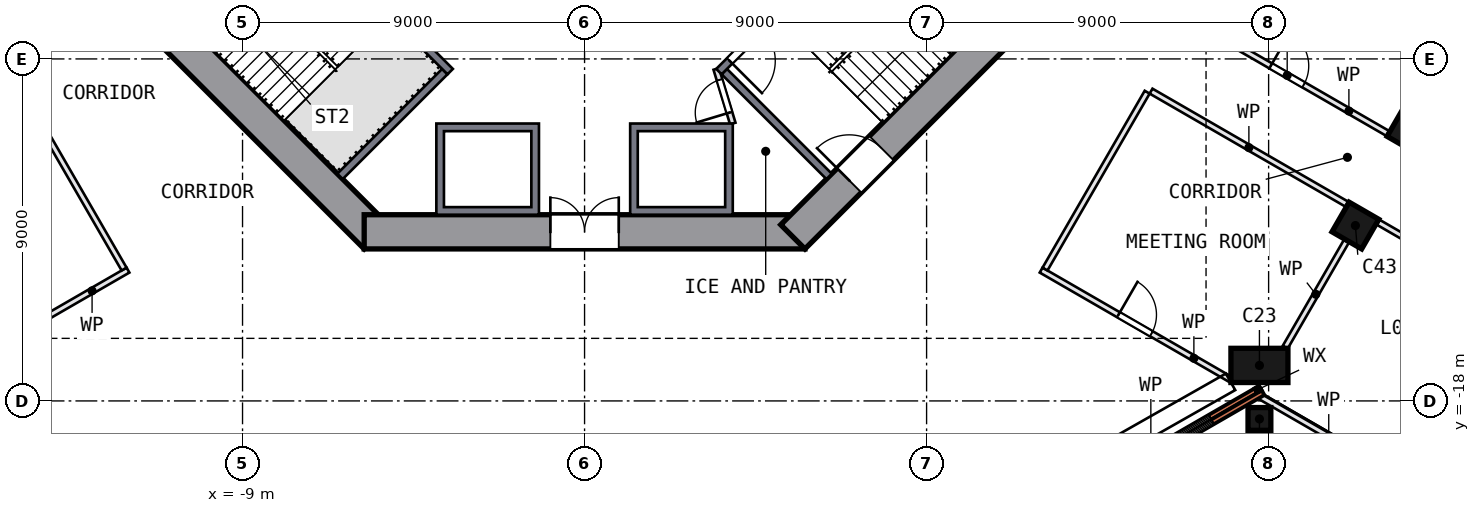
"""IFC4 building model, lengths in metres.
Left out: names, types, materials, properties, quantities, classifications, styles, units other than length and angle.
Written with IfcOpenShell. Run it as: python <this file> out.ifc"""

import sys

from ifc_helpers import new_model, si_unit, direction, frame, frame_2d, origin, origin_2d, place, context, subcontext, project, spatial, polyline, rectangle, outline, extrude, element, fill, save


model = new_model("IFC4")
c1 = context("Model", 3, precision=1e-05, world=origin(), true_north=direction((0.0, 1.0)))
c2 = subcontext(c1, "Body", "Model", "MODEL_VIEW")
j1 = project(units=[si_unit("LENGTHUNIT", "METRE"), si_unit("PLANEANGLEUNIT", "RADIAN")], contexts=[c1])
p1 = place(None, origin())
s1 = spatial("IfcSite", under=j1, at=p1, CompositionType="ELEMENT")
p2 = place(p1, origin())
s2 = spatial("IfcBuilding", under=s1, at=p2, CompositionType="ELEMENT")
p3 = place(p2, frame((0.0, 0.0, 14.0)))
s3 = spatial("IfcBuildingStorey", under=s2, at=p3, CompositionType="ELEMENT", Elevation=14.0)
p4 = place(p3, frame((17.758, -17.065, 0.0), z_axis=(0.0, 0.0, 1.0), x_axis=(-1.0, 0.0, 0.0)))
e1 = element("IfcColumn", 1, at=p4, inside=s3, PredefinedType="COLUMN", context=c2, shape_type="SweptSolid", body=[
    extrude(rectangle(XDim=1.5, YDim=0.9, at=origin_2d()), origin(), (0.0, 0.0, 1.0), 4.55),
])
for number, where, z_axis, x_axis in (
    (2, (20.283, -13.385, 0.0), (0.0, 0.0, 1.0), (0.866, -0.5, 0.0)),
    (3, (21.733, -10.873, 0.0), (0.0, 0.0, 1.0), (0.866, -0.5, 0.0)),
):
    element("IfcColumn", number, at=place(p3, frame(where, z_axis=z_axis, x_axis=x_axis)), inside=s3, PredefinedType="COLUMN", context=c2, shape_type="SweptSolid", body=[
        extrude(rectangle(XDim=0.9, YDim=0.9, at=origin_2d()), origin(), (0.0, 0.0, 1.0), 4.55),
    ])
p5 = place(p3, frame((-13.682, -5.481, 0.0), z_axis=(0.0, 0.0, 1.0), x_axis=(0.707106781, -0.707106781, 0.0)))
e4 = element("IfcWall", 4, at=p5, inside=s3, PredefinedType="SHEAR", context=c2, shape_type="SweptSolid", body=[
    extrude(rectangle(XDim=11.598, YDim=0.9, at=frame_2d((5.799, 0.0))), origin(), (0.0, 0.0, 1.0), 5.0),
])
p6 = place(p5, frame((2.099, 0.0, 0.0)))
e5 = element("IfcOpeningElement", 5, at=p6, cuts=e4, PredefinedType="OPENING", context=c2, shape_type="SweptSolid", body=[
    extrude(rectangle(XDim=1.2, YDim=2.1, at=frame_2d((0.6, 1.05))), frame((0.0, 0.46, 0.0), z_axis=(0.0, -1.0, 0.0), x_axis=(1.0, 0.0, 0.0)), (0.0, 0.0, 1.0), 0.92),
])
p7 = place(p3, frame((-5.799, -13.55, 0.0), z_axis=(0.0, 0.0, 1.0), x_axis=(1.0, 0.0, 0.0)))
e6 = element("IfcWall", 6, at=p7, inside=s3, PredefinedType="SHEAR", context=c2, shape_type="SweptSolid", body=[
    extrude(rectangle(XDim=11.598, YDim=0.9, at=frame_2d((5.799, 0.0))), origin(), (0.0, 0.0, 1.0), 5.0),
])
p8 = place(p7, frame((4.899, 0.0, 0.0)))
e7 = element("IfcOpeningElement", 7, at=p8, cuts=e6, PredefinedType="OPENING", context=c2, shape_type="SweptSolid", body=[
    extrude(rectangle(XDim=1.8, YDim=2.1, at=frame_2d((0.9, 1.05))), frame((0.0, 0.46, 0.0), z_axis=(0.0, -1.0, 0.0), x_axis=(1.0, 0.0, 0.0)), (0.0, 0.0, 1.0), 0.92),
])
p9 = place(p3, frame((5.481, -13.682, 0.0), z_axis=(0.0, 0.0, 1.0), x_axis=(0.707106781, 0.707106781, 0.0)))
e8 = element("IfcWall", 8, at=p9, inside=s3, PredefinedType="SHEAR", context=c2, shape_type="SweptSolid", body=[
    extrude(rectangle(XDim=11.598, YDim=0.9, at=frame_2d((5.799, 0.0))), origin(), (0.0, 0.0, 1.0), 5.0),
])
p10 = place(p9, frame((2.099, 0.0, 0.0)))
e9 = element("IfcOpeningElement", 9, at=p10, cuts=e8, PredefinedType="OPENING", context=c2, shape_type="SweptSolid", body=[
    extrude(rectangle(XDim=1.2, YDim=2.1, at=frame_2d((0.6, 1.05))), frame((0.0, 0.46, 0.0), z_axis=(0.0, -1.0, 0.0), x_axis=(1.0, 0.0, 0.0)), (0.0, 0.0, 1.0), 0.92),
])
p11 = place(p3, frame((17.758, -18.474, 0.0), z_axis=(0.0, 0.0, 1.0), x_axis=(0.0, -1.0, 0.0)))
e10 = element("IfcColumn", 10, at=p11, inside=s3, PredefinedType="COLUMN", context=c2, shape_type="SweptSolid", body=[
    extrude(rectangle(XDim=0.6, YDim=0.6, at=origin_2d()), origin(), (0.0, 0.0, 1.0), 5.0),
])
p12 = place(p3, frame((-17.828, -17.637, 0.0), z_axis=(0.0, 0.0, 1.0), x_axis=(0.866029009, -0.499993756, 0.0)))
e11 = element("IfcWall", 11, at=p12, inside=s3, PredefinedType="SOLIDWALL", context=c2, shape_type="SweptSolid", body=[
    extrude(rectangle(XDim=13.242, YDim=0.14, at=frame_2d((6.621, 0.0))), origin(), (0.0, 0.0, 1.0), 4.55),
])
p13 = place(p12, frame((1.46, 0.0, 0.9)))
e12 = element("IfcOpeningElement", 12, at=p13, cuts=e11, PredefinedType="OPENING", context=c2, shape_type="SweptSolid", body=[
    extrude(rectangle(XDim=3.6, YDim=2.7, at=frame_2d((1.8, 1.35))), frame((0.0, 0.08, 0.0), z_axis=(0.0, -1.0, 0.0), x_axis=(1.0, 0.0, 0.0)), (0.0, 0.0, 1.0), 0.16),
])
p14 = place(p12, frame((8.215, 0.0, 0.9)))
e13 = element("IfcOpeningElement", 13, at=p14, cuts=e11, PredefinedType="OPENING", context=c2, shape_type="SweptSolid", body=[
    extrude(rectangle(XDim=3.0, YDim=2.7, at=frame_2d((1.5, 1.35))), frame((0.0, 0.08, 0.0), z_axis=(0.0, -1.0, 0.0), x_axis=(1.0, 0.0, 0.0)), (0.0, 0.0, 1.0), 0.16),
])
p15 = place(p3, frame((6.603, -24.118, 0.0), z_axis=(0.0, 0.0, 1.0), x_axis=(0.866018135, 0.50001259, 0.0)))
e14 = element("IfcWall", 14, at=p15, inside=s3, PredefinedType="SOLIDWALL", context=c2, shape_type="SweptSolid", body=[
    extrude(rectangle(XDim=12.771, YDim=0.14, at=frame_2d((6.386, 0.0))), origin(), (0.0, 0.0, 1.0), 4.55),
])
p16 = place(p15, frame((1.883, 0.0, 0.9)))
e15 = element("IfcOpeningElement", 15, at=p16, cuts=e14, PredefinedType="OPENING", context=c2, shape_type="SweptSolid", body=[
    extrude(rectangle(XDim=2.4, YDim=2.7, at=frame_2d((1.2, 1.35))), frame((0.0, 0.08, 0.0), z_axis=(0.0, -1.0, 0.0), x_axis=(1.0, 0.0, 0.0)), (0.0, 0.0, 1.0), 0.16),
])
p17 = place(p15, frame((7.782, 0.0, 0.9)))
e16 = element("IfcOpeningElement", 16, at=p17, cuts=e14, PredefinedType="OPENING", context=c2, shape_type="SweptSolid", body=[
    extrude(rectangle(XDim=3.6, YDim=2.7, at=frame_2d((1.8, 1.35))), frame((0.0, 0.08, 0.0), z_axis=(0.0, -1.0, 0.0), x_axis=(1.0, 0.0, 0.0)), (0.0, 0.0, 1.0), 0.16),
])
p18 = place(p3, frame((17.688, -17.637, 0.0), z_axis=(0.0, 0.0, 1.0), x_axis=(0.500829891, -0.865545735, 0.0)))
e17 = element("IfcWall", 17, at=p18, inside=s3, PredefinedType="SOLIDWALL", context=c2, shape_type="SweptSolid", body=[
    extrude(rectangle(XDim=0.14, YDim=0.14, at=frame_2d((0.07, 0.0))), origin(), (0.0, 0.0, 1.0), 4.55),
])
p19 = place(p3, frame((17.854, -17.784, 0.0), z_axis=(0.0, 0.0, 1.0), x_axis=(-0.866036463, -0.499980844, 0.0)))
e18 = element("IfcWall", 18, at=p19, inside=s3, PredefinedType="SOLIDWALL", context=c2, shape_type="SweptSolid", body=[
    extrude(rectangle(XDim=7.334, YDim=0.14, at=frame_2d((3.667, 0.0))), origin(), (0.0, 0.0, 1.0), 4.55),
])
p20 = place(p19, frame((1.529, 0.0, 0.9)))
e19 = element("IfcOpeningElement", 19, at=p20, cuts=e18, PredefinedType="OPENING", context=c2, shape_type="SweptSolid", body=[
    extrude(rectangle(XDim=3.6, YDim=2.7, at=frame_2d((1.8, 1.35))), frame((0.0, 0.08, 0.0), z_axis=(0.0, -1.0, 0.0), x_axis=(1.0, 0.0, 0.0)), (0.0, 0.0, 1.0), 0.16),
])
p21 = place(p3, origin())
e20 = element("IfcWall", 20, at=p21, inside=s3, PredefinedType="SOLIDWALL", context=c2, shape_type="SweptSolid", body=[
    extrude(outline(polyline([(-1.2, -13.1), (-3.9, -13.1), (-3.9, -10.7), (-1.2, -10.7), (-1.2, -13.1)]), holes=[polyline([(-3.7, -10.9), (-3.7, -12.9), (-1.4, -12.9), (-1.4, -10.9), (-3.7, -10.9)])]), origin(), (0.0, 0.0, 1.0), 4.55),
])
p22 = place(p3, origin())
e21 = element("IfcWall", 21, at=p22, inside=s3, PredefinedType="SOLIDWALL", context=c2, shape_type="SweptSolid", body=[
    extrude(outline(polyline([(3.9, -10.7), (3.9, -13.1), (1.2, -13.1), (1.2, -10.7), (3.9, -10.7)]), holes=[polyline([(1.4, -12.9), (3.7, -12.9), (3.7, -10.9), (1.4, -10.9), (1.4, -12.9)])]), origin(), (0.0, 0.0, 1.0), 4.55),
])
p23 = place(p3, frame((-3.535, -9.334, 0.0), z_axis=(0.0, 0.0, 1.0), x_axis=(-0.707106781, 0.707106781, 0.0)))
e22 = element("IfcWall", 22, at=p23, inside=s3, PredefinedType="SOLIDWALL", context=c2, shape_type="SweptSolid", body=[
    extrude(rectangle(XDim=8.2, YDim=0.2, at=frame_2d((4.1, 0.0))), origin(), (0.0, 0.0, 1.0), 4.55),
])
p24 = place(p23, frame((6.6, 0.0, 0.0)))
e23 = element("IfcOpeningElement", 23, at=p24, cuts=e22, PredefinedType="OPENING", context=c2, shape_type="SweptSolid", body=[
    extrude(rectangle(XDim=1.2, YDim=2.1, at=frame_2d((0.6, 1.05))), frame((0.0, 0.11, 0.0), z_axis=(0.0, -1.0, 0.0), x_axis=(1.0, 0.0, 0.0)), (0.0, 0.0, 1.0), 0.22),
])
p25 = place(p3, frame((-3.677, -9.334, 0.0), z_axis=(0.0, 0.0, 1.0), x_axis=(-0.707106781, -0.707106781, 0.0)))
e24 = element("IfcWall", 24, at=p25, inside=s3, PredefinedType="SOLIDWALL", context=c2, shape_type="SweptSolid", body=[
    extrude(rectangle(XDim=3.9, YDim=0.2, at=frame_2d((1.95, 0.0))), origin(), (0.0, 0.0, 1.0), 4.55),
])
p26 = place(p3, frame((9.334, -3.535, 0.0), z_axis=(0.0, 0.0, 1.0), x_axis=(-0.707106781, -0.707106781, 0.0)))
e25 = element("IfcWall", 25, at=p26, inside=s3, PredefinedType="SOLIDWALL", context=c2, shape_type="SweptSolid", body=[
    extrude(rectangle(XDim=8.2, YDim=0.2, at=frame_2d((4.1, 0.0))), origin(), (0.0, 0.0, 1.0), 4.55),
])
p27 = place(p26, frame((6.6, 0.0, 0.0)))
e26 = element("IfcOpeningElement", 26, at=p27, cuts=e25, PredefinedType="OPENING", context=c2, shape_type="SweptSolid", body=[
    extrude(rectangle(XDim=1.2, YDim=2.1, at=frame_2d((0.6, 1.05))), frame((0.0, 0.11, 0.0), z_axis=(0.0, -1.0, 0.0), x_axis=(1.0, 0.0, 0.0)), (0.0, 0.0, 1.0), 0.22),
])
p28 = place(p3, frame((3.677, -9.334, 0.0), z_axis=(0.0, 0.0, 1.0), x_axis=(0.707106781, -0.707106781, 0.0)))
e27 = element("IfcWall", 27, at=p28, inside=s3, PredefinedType="SOLIDWALL", context=c2, shape_type="SweptSolid", body=[
    extrude(rectangle(XDim=3.9, YDim=0.2, at=frame_2d((1.95, 0.0))), origin(), (0.0, 0.0, 1.0), 4.55),
])
p29 = place(p3, frame((3.9, -10.7, 0.0), z_axis=(0.0, 0.0, 1.0), x_axis=(-0.289808785, 0.957084567, 0.0)))
e28 = element("IfcWall", 28, at=p29, inside=s3, PredefinedType="PARTITIONING", context=c2, shape_type="SweptSolid", body=[
    extrude(rectangle(XDim=1.501, YDim=0.15, at=frame_2d((0.75, 0.0))), origin(), (0.0, 0.0, 1.0), 4.55),
])
p30 = place(p29, frame((0.301, 0.0, 0.0)))
e29 = element("IfcOpeningElement", 29, at=p30, cuts=e28, PredefinedType="OPENING", context=c2, shape_type="SweptSolid", body=[
    extrude(rectangle(XDim=0.9, YDim=2.1, at=frame_2d((0.45, 1.05))), frame((0.0, 0.085, 0.0), z_axis=(0.0, -1.0, 0.0), x_axis=(1.0, 0.0, 0.0)), (0.0, 0.0, 1.0), 0.17),
])
p31 = place(p3, frame((-16.978, -17.424, 0.0), z_axis=(0.0, 0.0, 1.0), x_axis=(0.866011812, 0.500023541, 0.0)))
e30 = element("IfcWall", 30, at=p31, inside=s3, PredefinedType="PARTITIONING", context=c2, shape_type="SweptSolid", body=[
    extrude(rectangle(XDim=5.732, YDim=0.15, at=frame_2d((2.866, 0.0))), origin(), (0.0, 0.0, 1.0), 4.55),
])
p32 = place(p31, frame((2.35, 0.0, 0.0)))
e31 = element("IfcOpeningElement", 31, at=p32, cuts=e30, PredefinedType="OPENING", context=c2, shape_type="SweptSolid", body=[
    extrude(rectangle(XDim=1.0, YDim=2.1, at=frame_2d((0.5, 1.05))), frame((0.0, 0.085, 0.0), z_axis=(0.0, -1.0, 0.0), x_axis=(1.0, 0.0, 0.0)), (0.0, 0.0, 1.0), 0.17),
])
p33 = place(p3, frame((-12.117, -14.53, 0.0), z_axis=(0.0, 0.0, 1.0), x_axis=(-0.4999885, 0.866032043, 0.0)))
e32 = element("IfcWall", 32, at=p33, inside=s3, PredefinedType="PARTITIONING", context=c2, shape_type="SweptSolid", body=[
    extrude(rectangle(XDim=5.375, YDim=0.15, at=frame_2d((2.688, 0.0))), origin(), (0.0, 0.0, 1.0), 4.55),
])
p34 = place(p3, frame((12.014, -14.557, 0.0), z_axis=(0.0, 0.0, 1.0), x_axis=(0.866011812, -0.500023541, 0.0)))
e33 = element("IfcWall", 33, at=p34, inside=s3, PredefinedType="PARTITIONING", context=c2, shape_type="SweptSolid", body=[
    extrude(rectangle(XDim=5.732, YDim=0.15, at=frame_2d((2.866, 0.0))), origin(), (0.0, 0.0, 1.0), 4.55),
])
p35 = place(p34, frame((2.35, 0.0, 0.0)))
e34 = element("IfcOpeningElement", 34, at=p35, cuts=e33, PredefinedType="OPENING", context=c2, shape_type="SweptSolid", body=[
    extrude(rectangle(XDim=1.0, YDim=2.1, at=frame_2d((0.5, 1.05))), frame((0.0, 0.085, 0.0), z_axis=(0.0, -1.0, 0.0), x_axis=(1.0, 0.0, 0.0)), (0.0, 0.0, 1.0), 0.17),
])
p36 = place(p3, frame((14.804, -9.875, 0.0), z_axis=(0.0, 0.0, 1.0), x_axis=(-0.4999885, -0.866032043, 0.0)))
e35 = element("IfcWall", 35, at=p36, inside=s3, PredefinedType="PARTITIONING", context=c2, shape_type="SweptSolid", body=[
    extrude(rectangle(XDim=5.375, YDim=0.15, at=frame_2d((2.688, 0.0))), origin(), (0.0, 0.0, 1.0), 4.55),
])
p37 = place(p3, frame((14.906, -9.848, 0.0), z_axis=(0.0, 0.0, 1.0), x_axis=(0.866038559, -0.499977214, 0.0)))
e36 = element("IfcWall", 36, at=p37, inside=s3, PredefinedType="PARTITIONING", context=c2, shape_type="SweptSolid", body=[
    extrude(rectangle(XDim=5.945, YDim=0.15, at=frame_2d((2.973, 0.0))), origin(), (0.0, 0.0, 1.0), 4.55),
])
p38 = place(p3, frame((20.886, -13.3, 0.0), z_axis=(0.0, 0.0, 1.0), x_axis=(0.866012734, -0.500021944, 0.0)))
e37 = element("IfcWall", 37, at=p38, inside=s3, PredefinedType="PARTITIONING", context=c2, shape_type="SweptSolid", body=[
    extrude(rectangle(XDim=3.787, YDim=0.15, at=frame_2d((1.894, 0.0))), origin(), (0.0, 0.0, 1.0), 4.55),
])
p39 = place(p3, frame((18.438, -16.585, 0.0), z_axis=(0.0, 0.0, 1.0), x_axis=(0.500027049, 0.866009787, 0.0)))
e38 = element("IfcWall", 38, at=p39, inside=s3, PredefinedType="PARTITIONING", context=c2, shape_type="SweptSolid", body=[
    extrude(rectangle(XDim=3.215, YDim=0.15, at=frame_2d((1.607, 0.0))), origin(), (0.0, 0.0, 1.0), 4.55),
])
p40 = place(p3, frame((17.761, -17.875, 0.0), z_axis=(0.0, 0.0, 1.0), x_axis=(0.866016441, -0.500015524, 0.0)))
e39 = element("IfcWall", 39, at=p40, inside=s3, PredefinedType="PARTITIONING", context=c2, shape_type="SweptSolid", body=[
    extrude(rectangle(XDim=4.206, YDim=0.15, at=frame_2d((2.103, 0.0))), origin(), (0.0, 0.0, 1.0), 4.55),
])
p41 = place(p3, frame((21.506, -19.951, 0.0), z_axis=(0.0, 0.0, 1.0), x_axis=(0.500008168, 0.866020688, 0.0)))
e40 = element("IfcWall", 40, at=p41, inside=s3, PredefinedType="PARTITIONING", context=c2, shape_type="SweptSolid", body=[
    extrude(rectangle(XDim=5.375, YDim=0.15, at=frame_2d((2.688, 0.0))), origin(), (0.0, 0.0, 1.0), 4.55),
])
p42 = place(p41, frame((2.225, 0.0, 0.0)))
e41 = element("IfcOpeningElement", 41, at=p42, cuts=e40, PredefinedType="OPENING", context=c2, shape_type="SweptSolid", body=[
    extrude(rectangle(XDim=1.0, YDim=2.1, at=frame_2d((0.5, 1.05))), frame((0.0, 0.085, 0.0), z_axis=(0.0, -1.0, 0.0), x_axis=(1.0, 0.0, 0.0)), (0.0, 0.0, 1.0), 0.17),
])
p43 = place(p3, frame((15.982, -7.986, 0.0), z_axis=(0.0, 0.0, 1.0), x_axis=(0.86601051, -0.500025795, 0.0)))
e42 = element("IfcWall", 42, at=p43, inside=s3, PredefinedType="PARTITIONING", context=c2, shape_type="SweptSolid", body=[
    extrude(rectangle(XDim=5.945, YDim=0.15, at=frame_2d((2.973, 0.0))), origin(), (0.0, 0.0, 1.0), 4.55),
])
p44 = place(p43, frame((2.395, 0.0, 0.0)))
e43 = element("IfcOpeningElement", 43, at=p44, cuts=e42, PredefinedType="OPENING", context=c2, shape_type="SweptSolid", body=[
    extrude(rectangle(XDim=1.0, YDim=2.1, at=frame_2d((0.5, 1.05))), frame((0.0, 0.085, 0.0), z_axis=(0.0, -1.0, 0.0), x_axis=(1.0, 0.0, 0.0)), (0.0, 0.0, 1.0), 0.17),
])
p45 = place(p13, origin())
e44 = element("IfcWindow", 44, at=p45, inside=s3, PartitioningType="SINGLE_PANEL", PredefinedType="WINDOW", context=c2, shape_type="SweptSolid", body=[
    extrude(rectangle(XDim=3.6, YDim=2.7, at=frame_2d((1.8, 1.35))), frame((0.0, 0.03, 0.0), z_axis=(0.0, -1.0, 0.0), x_axis=(1.0, 0.0, 0.0)), (0.0, 0.0, 1.0), 0.06),
])
fill(e12, e44)
p46 = place(p17, origin())
e45 = element("IfcWindow", 45, at=p46, inside=s3, PartitioningType="SINGLE_PANEL", PredefinedType="WINDOW", context=c2, shape_type="SweptSolid", body=[
    extrude(rectangle(XDim=3.6, YDim=2.7, at=frame_2d((1.8, 1.35))), frame((0.0, 0.03, 0.0), z_axis=(0.0, -1.0, 0.0), x_axis=(1.0, 0.0, 0.0)), (0.0, 0.0, 1.0), 0.06),
])
fill(e16, e45)
p47 = place(p20, origin())
e46 = element("IfcWindow", 46, at=p47, inside=s3, PartitioningType="SINGLE_PANEL", PredefinedType="WINDOW", context=c2, shape_type="SweptSolid", body=[
    extrude(rectangle(XDim=3.6, YDim=2.7, at=frame_2d((1.8, 1.35))), frame((0.0, 0.03, 0.0), z_axis=(0.0, -1.0, 0.0), x_axis=(1.0, 0.0, 0.0)), (0.0, 0.0, 1.0), 0.06),
])
fill(e19, e46)
p48 = place(p27, origin())
e47 = element("IfcDoor", 47, at=p48, inside=s3, OperationType="SINGLE_SWING_RIGHT", PredefinedType="DOOR", context=c2, shape_type="SweptSolid", body=[
    extrude(rectangle(XDim=1.2, YDim=2.1, at=frame_2d((0.6, 1.05))), frame((0.0, 0.025, 0.0), z_axis=(0.0, -1.0, 0.0), x_axis=(1.0, 0.0, 0.0)), (0.0, 0.0, 1.0), 0.05),
])
fill(e26, e47)
p49 = place(p8, origin())
e48 = element("IfcDoor", 48, at=p49, inside=s3, OperationType="DOUBLE_DOOR_SINGLE_SWING", PredefinedType="DOOR", context=c2, shape_type="SweptSolid", body=[
    extrude(rectangle(XDim=1.8, YDim=2.1, at=frame_2d((0.9, 1.05))), frame((0.0, 0.025, 0.0), z_axis=(0.0, -1.0, 0.0), x_axis=(1.0, 0.0, 0.0)), (0.0, 0.0, 1.0), 0.05),
])
fill(e7, e48)
p50 = place(p10, origin())
e49 = element("IfcDoor", 49, at=p50, inside=s3, OperationType="SINGLE_SWING_LEFT", PredefinedType="DOOR", context=c2, shape_type="SweptSolid", body=[
    extrude(rectangle(XDim=1.2, YDim=2.1, at=frame_2d((0.6, 1.05))), frame((0.0, 0.025, 0.0), z_axis=(0.0, -1.0, 0.0), x_axis=(1.0, 0.0, 0.0)), (0.0, 0.0, 1.0), 0.05),
])
fill(e9, e49)
p51 = place(p30, origin())
e50 = element("IfcDoor", 50, at=p51, inside=s3, OperationType="SINGLE_SWING_LEFT", PredefinedType="DOOR", context=c2, shape_type="SweptSolid", body=[
    extrude(rectangle(XDim=0.9, YDim=2.1, at=frame_2d((0.45, 1.05))), frame((0.0, 0.025, 0.0), z_axis=(0.0, -1.0, 0.0), x_axis=(1.0, 0.0, 0.0)), (0.0, 0.0, 1.0), 0.05),
])
fill(e29, e50)
p52 = place(p35, origin())
e51 = element("IfcDoor", 51, at=p52, inside=s3, OperationType="SINGLE_SWING_LEFT", PredefinedType="DOOR", context=c2, shape_type="SweptSolid", body=[
    extrude(rectangle(XDim=1.0, YDim=2.1, at=frame_2d((0.5, 1.05))), frame((0.0, 0.025, 0.0), z_axis=(0.0, -1.0, 0.0), x_axis=(1.0, 0.0, 0.0)), (0.0, 0.0, 1.0), 0.05),
])
fill(e34, e51)
p53 = place(p44, origin())
e52 = element("IfcDoor", 52, at=p53, inside=s3, OperationType="SINGLE_SWING_LEFT", PredefinedType="DOOR", context=c2, shape_type="SweptSolid", body=[
    extrude(rectangle(XDim=1.0, YDim=2.1, at=frame_2d((0.5, 1.05))), frame((0.0, 0.025, 0.0), z_axis=(0.0, -1.0, 0.0), x_axis=(1.0, 0.0, 0.0)), (0.0, 0.0, 1.0), 0.05),
])
fill(e43, e52)
save(model, sys.argv[1])
